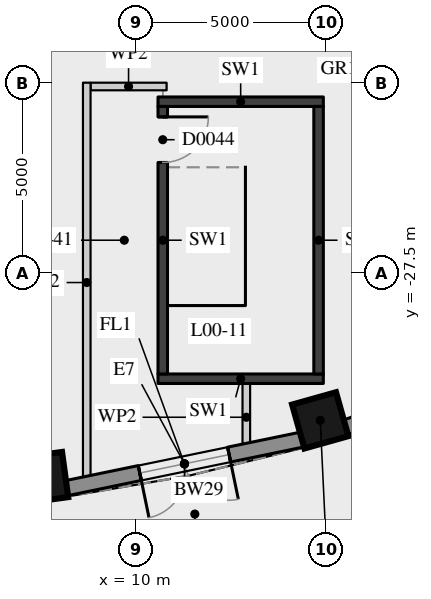
"""IFC4 building model, lengths in metres.
Left out: names, types, materials, properties, quantities, classifications, styles, units other than length and angle.
Written with IfcOpenShell. Run it as: python <this file> out.ifc"""

import sys

from ifc_helpers import new_model, si_unit, direction, frame, frame_2d, origin, origin_2d, place, context, subcontext, project, spatial, rectangle, extrude, element, fill, save


model = new_model("IFC4")
c1 = context("Model", 3, precision=1e-05, world=origin(), true_north=direction((0.0, 1.0)))
c2 = subcontext(c1, "Body", "Model", "MODEL_VIEW")
j1 = project(units=[si_unit("LENGTHUNIT", "METRE"), si_unit("PLANEANGLEUNIT", "RADIAN")], contexts=[c1])
p1 = place(None, origin())
s1 = spatial("IfcSite", under=j1, at=p1, CompositionType="ELEMENT")
p2 = place(p1, origin())
s2 = spatial("IfcBuilding", under=s1, at=p2, CompositionType="ELEMENT")
p3 = place(p2, origin())
s3 = spatial("IfcBuildingStorey", under=s2, at=p3, CompositionType="ELEMENT", Elevation=0.0)
for number, where, z_axis, x_axis in (
    (1, (7.536, -32.893, 0.0), (0.0, 0.0, 1.0), (0.135, -0.991, 0.0)),
    (2, (14.844, -31.386, 0.0), (0.0, 0.0, 1.0), (0.271, -0.963, 0.0)),
):
    element("IfcColumn", number, at=place(p3, frame(where, z_axis=z_axis, x_axis=x_axis)), inside=s3, PredefinedType="COLUMN", context=c2, shape_type="SweptSolid", body=[
        extrude(rectangle(XDim=1.2, YDim=1.2, at=origin_2d()), origin(), (0.0, 0.0, 1.0), 7.5),
    ])
p4 = place(p3, frame((8.15, -33.173, 0.0), z_axis=(0.0, 0.0, 1.0), x_axis=(0.979388896242, 0.201983637746, 0.0)))
e3 = element("IfcWall", 3, at=p4, inside=s3, PredefinedType="SOLIDWALL", context=c2, shape_type="SweptSolid", body=[
    extrude(rectangle(XDim=6.374, YDim=0.4, at=frame_2d((3.187, 0.0))), origin(), (0.0, 0.0, 1.0), 6.19),
])
p5 = place(p4, frame((1.987, 0.0, 0.0)))
e4 = element("IfcOpeningElement", 4, at=p5, cuts=e3, PredefinedType="OPENING", context=c2, shape_type="SweptSolid", body=[
    extrude(rectangle(XDim=2.4, YDim=2.2, at=frame_2d((1.2, 1.1))), frame((0.0, 0.21, 0.0), z_axis=(0.0, -1.0, 0.0), x_axis=(1.0, 0.0, 0.0)), (0.0, 0.0, 1.0), 0.42),
])
p6 = place(p4, frame((1.987, 0.0, 2.6)))
e5 = element("IfcOpeningElement", 5, at=p6, cuts=e3, PredefinedType="OPENING", context=c2, shape_type="SweptSolid", body=[
    extrude(rectangle(XDim=2.4, YDim=3.49, at=frame_2d((1.2, 1.745))), frame((0.0, 0.21, 0.0), z_axis=(0.0, -1.0, 0.0), x_axis=(1.0, 0.0, 0.0)), (0.0, 0.0, 1.0), 0.42),
])
p7 = place(p3, frame((15.49, -31.577, 0.0), z_axis=(0.0, 0.0, 1.0), x_axis=(0.941225814421, 0.337777983694, 0.0)))
e6 = element("IfcWall", 6, at=p7, inside=s3, PredefinedType="SOLIDWALL", context=c2, shape_type="SweptSolid", body=[
    extrude(rectangle(XDim=6.199, YDim=0.4, at=frame_2d((3.1, 0.0))), origin(), (0.0, 0.0, 1.0), 6.19),
])
p8 = place(p7, frame((1.9, 0.0, 0.0)))
e7 = element("IfcOpeningElement", 7, at=p8, cuts=e6, PredefinedType="OPENING", context=c2, shape_type="SweptSolid", body=[
    extrude(rectangle(XDim=2.4, YDim=2.2, at=frame_2d((1.2, 1.1))), frame((0.0, 0.21, 0.0), z_axis=(0.0, -1.0, 0.0), x_axis=(1.0, 0.0, 0.0)), (0.0, 0.0, 1.0), 0.42),
])
p9 = place(p7, frame((1.9, 0.0, 2.6)))
e8 = element("IfcOpeningElement", 8, at=p9, cuts=e6, PredefinedType="OPENING", context=c2, shape_type="SweptSolid", body=[
    extrude(rectangle(XDim=2.4, YDim=3.49, at=frame_2d((1.2, 1.745))), frame((0.0, 0.21, 0.0), z_axis=(0.0, -1.0, 0.0), x_axis=(1.0, 0.0, 0.0)), (0.0, 0.0, 1.0), 0.42),
])
for number, where, z_axis, x_axis in (
    (9, (10.575, -30.29, 0.0), (0.0, 0.0, 1.0), (1.0, 0.0, 0.0)),
    (10, (10.575, -23.0, 0.0), (0.0, 0.0, 1.0), (1.0, 0.0, 0.0)),
):
    element("IfcWall", number, at=place(p3, frame(where, z_axis=z_axis, x_axis=x_axis)), inside=s3, PredefinedType="SOLIDWALL", context=c2, shape_type="SweptSolid", body=[
        extrude(rectangle(XDim=4.35, YDim=0.25, at=frame_2d((2.175, 0.0))), origin(), (0.0, 0.0, 1.0), 7.09),
    ])
p10 = place(p3, frame((8.8, -22.6, 0.0), z_axis=(0.0, 0.0, 1.0), x_axis=(1.0, 0.0, 0.0)))
e11 = element("IfcWall", 11, at=p10, inside=s3, PredefinedType="PARTITIONING", context=c2, shape_type="SweptSolid", body=[
    extrude(rectangle(XDim=2.0, YDim=0.2, at=frame_2d((1.0, 0.0))), origin(), (0.0, 0.0, 1.0), 7.09),
])
p11 = place(p3, frame((8.7, -33.017, 0.0), z_axis=(0.0, 0.0, 1.0), x_axis=(0.0, 1.0, 0.0)))
e12 = element("IfcWall", 12, at=p11, inside=s3, PredefinedType="PARTITIONING", context=c2, shape_type="SweptSolid", body=[
    extrude(rectangle(XDim=10.517, YDim=0.2, at=frame_2d((5.259, 0.0))), origin(), (0.0, 0.0, 1.0), 7.09),
])
p12 = place(p3, frame((10.7, -30.165, 0.0), z_axis=(0.0, 0.0, 1.0), x_axis=(0.0, 1.0, 0.0)))
e13 = element("IfcWall", 13, at=p12, inside=s3, PredefinedType="SOLIDWALL", context=c2, shape_type="SweptSolid", body=[
    extrude(rectangle(XDim=7.04, YDim=0.25, at=frame_2d((3.52, 0.0))), origin(), (0.0, 0.0, 1.0), 7.09),
])
p13 = place(p12, frame((5.565, 0.0, 0.0)))
e14 = element("IfcOpeningElement", 14, at=p13, cuts=e13, PredefinedType="OPENING", context=c2, shape_type="SweptSolid", body=[
    extrude(rectangle(XDim=1.2, YDim=2.1, at=frame_2d((0.6, 1.05))), frame((0.0, 0.135, 0.0), z_axis=(0.0, -1.0, 0.0), x_axis=(1.0, 0.0, 0.0)), (0.0, 0.0, 1.0), 0.27),
])
p14 = place(p3, frame((12.899, -32.192, 0.0), z_axis=(0.0, 0.0, 1.0), x_axis=(0.0, 1.0, 0.0)))
e15 = element("IfcWall", 15, at=p14, inside=s3, PredefinedType="PARTITIONING", context=c2, shape_type="SweptSolid", body=[
    extrude(rectangle(XDim=1.777, YDim=0.2, at=frame_2d((0.889, 0.0))), origin(), (0.0, 0.0, 1.0), 7.09),
])
p15 = place(p3, frame((14.8, -30.165, 0.0), z_axis=(0.0, 0.0, 1.0), x_axis=(0.0, 1.0, 0.0)))
e16 = element("IfcWall", 16, at=p15, inside=s3, PredefinedType="SOLIDWALL", context=c2, shape_type="SweptSolid", body=[
    extrude(rectangle(XDim=7.04, YDim=0.25, at=frame_2d((3.52, 0.0))), origin(), (0.0, 0.0, 1.0), 7.09),
])
p16 = place(p5, frame((2.4, 0.0, 0.0), z_axis=(0.0, 0.0, 1.0), x_axis=(-1.0, 0.0, 0.0)))
e17 = element("IfcDoor", 17, at=p16, inside=s3, OperationType="DOUBLE_DOOR_SINGLE_SWING", PredefinedType="DOOR", context=c2, shape_type="SweptSolid", body=[
    extrude(rectangle(XDim=2.4, YDim=2.2, at=frame_2d((1.2, 1.1))), frame((0.0, 0.05, 0.0), z_axis=(0.0, -1.0, 0.0), x_axis=(1.0, 0.0, 0.0)), (0.0, 0.0, 1.0), 0.05),
])
fill(e4, e17)
p17 = place(p6, origin())
e18 = element("IfcWindow", 18, at=p17, inside=s3, PartitioningType="SINGLE_PANEL", PredefinedType="WINDOW", context=c2, shape_type="SweptSolid", body=[
    extrude(rectangle(XDim=2.4, YDim=3.49, at=frame_2d((1.2, 1.745))), frame((0.0, 0.01, 0.0), z_axis=(0.0, -1.0, 0.0), x_axis=(1.0, 0.0, 0.0)), (0.0, 0.0, 1.0), 0.06),
])
fill(e5, e18)
p18 = place(p13, origin())
e19 = element("IfcDoor", 19, at=p18, inside=s3, OperationType="SINGLE_SWING_LEFT", PredefinedType="DOOR", context=c2, shape_type="SweptSolid", body=[
    extrude(rectangle(XDim=1.2, YDim=2.1, at=frame_2d((0.6, 1.05))), frame((0.0, 0.025, 0.0), z_axis=(0.0, -1.0, 0.0), x_axis=(1.0, 0.0, 0.0)), (0.0, 0.0, 1.0), 0.05),
])
fill(e14, e19)
save(model, sys.argv[1])
